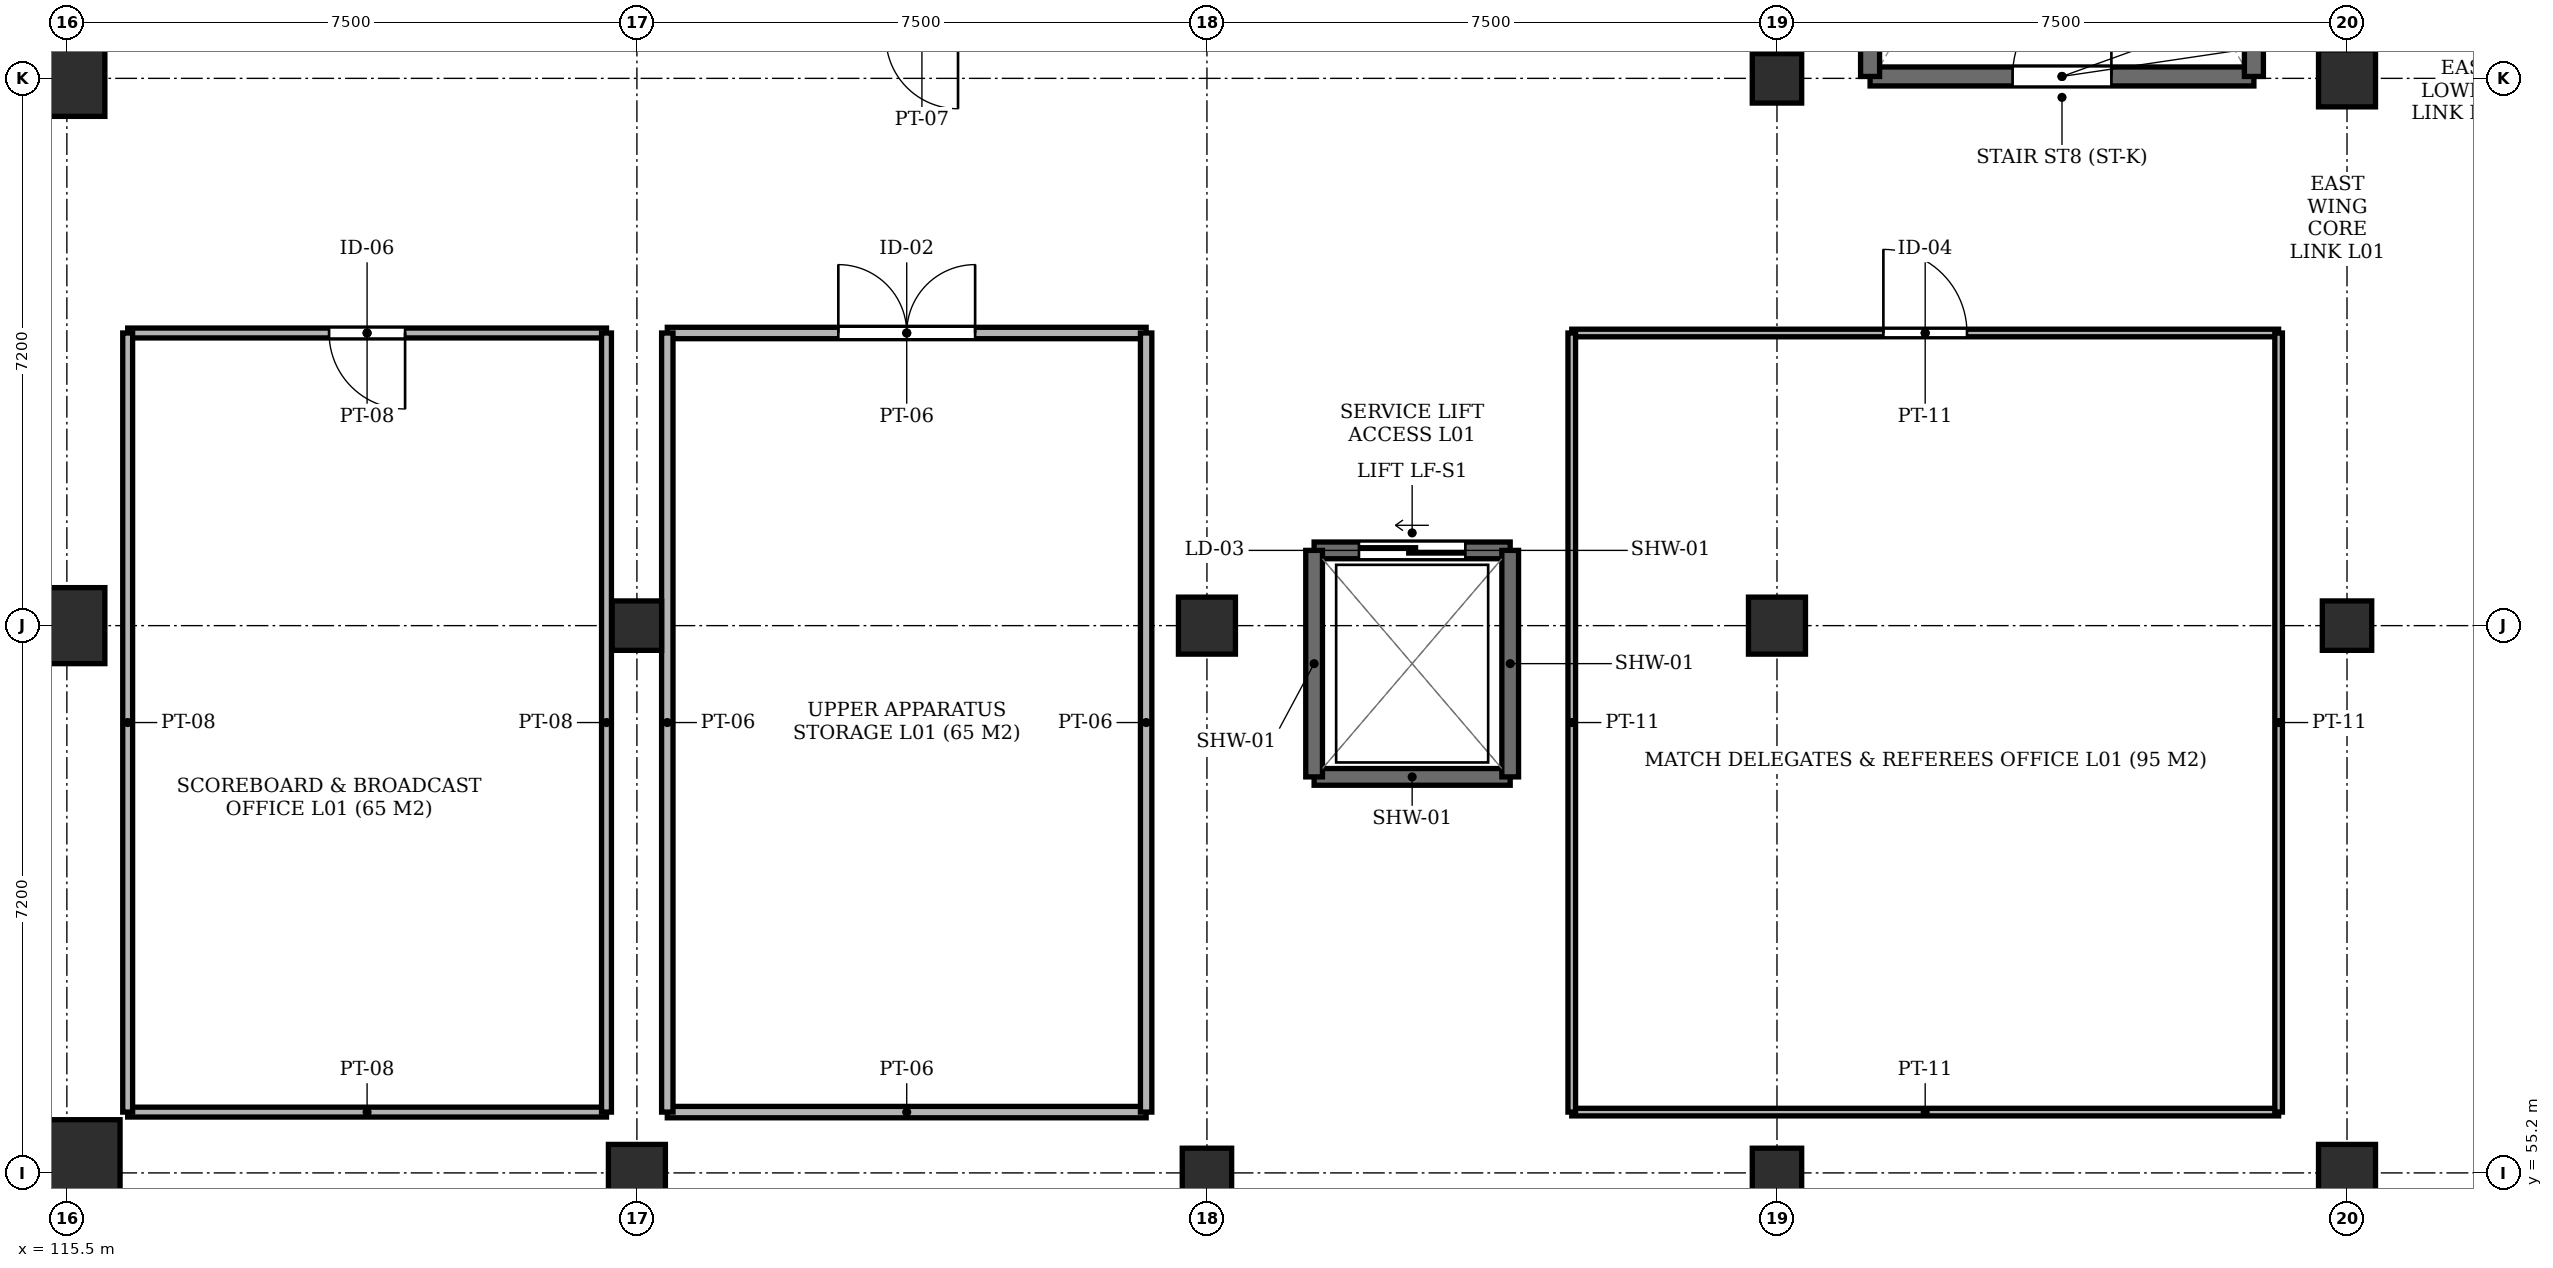
"""IFC4 building model, lengths in metres.
Left out: names, types, materials, properties, quantities, classifications, styles, units other than length and angle.
Written with IfcOpenShell. Run it as: python <this file> out.ifc"""

import sys

from ifc_helpers import new_model, si_unit, direction, frame, frame_2d, origin, origin_2d, place, context, subcontext, project, spatial, rectangle, extrude, element, fill, save


model = new_model("IFC4")
c1 = context("Model", 3, precision=1e-05, world=origin(), true_north=direction((0.0, 1.0)))
c2 = subcontext(c1, "Body", "Model", "MODEL_VIEW")
j1 = project(units=[si_unit("LENGTHUNIT", "METRE"), si_unit("PLANEANGLEUNIT", "RADIAN")], contexts=[c1])
p1 = place(None, origin())
s1 = spatial("IfcSite", under=j1, at=p1, CompositionType="ELEMENT")
p2 = place(p1, origin())
s2 = spatial("IfcBuilding", under=s1, at=p2, CompositionType="ELEMENT")
p3 = place(p2, frame((0.0, 0.0, 4.6)))
s3 = spatial("IfcBuildingStorey", under=s2, at=p3, CompositionType="ELEMENT", Elevation=4.6)
p4 = place(p3, frame((115.5, 55.2, -0.3), z_axis=(0.0, 0.0, 1.0), x_axis=(1.0, 0.0, 0.0)))
e1 = element("IfcColumn", 1, at=p4, inside=s3, PredefinedType="COLUMN", context=c2, shape_type="SweptSolid", body=[
    extrude(rectangle(XDim=1.4, YDim=1.4, at=origin_2d()), origin(), (0.0, 0.0, 1.0), 4.65),
])
for number, where, z_axis, x_axis in (
    (2, (115.5, 62.4, -0.3), (0.0, 0.0, 1.0), (1.0, 0.0, 0.0)),
    (3, (115.5, 69.6, -0.3), (0.0, 0.0, 1.0), (1.0, 0.0, 0.0)),
):
    element("IfcColumn", number, at=place(p3, frame(where, z_axis=z_axis, x_axis=x_axis)), inside=s3, PredefinedType="COLUMN", context=c2, shape_type="SweptSolid", body=[
        extrude(rectangle(XDim=1.0, YDim=1.0, at=origin_2d()), origin(), (0.0, 0.0, 1.0), 4.65),
    ])
p5 = place(p3, frame((123.0, 55.2, -0.3), z_axis=(0.0, 0.0, 1.0), x_axis=(1.0, 0.0, 0.0)))
e4 = element("IfcColumn", 4, at=p5, inside=s3, PredefinedType="COLUMN", context=c2, shape_type="SweptSolid", body=[
    extrude(rectangle(XDim=0.75, YDim=0.75, at=origin_2d()), origin(), (0.0, 0.0, 1.0), 4.65),
])
for number, where, z_axis, x_axis in (
    (5, (123.0, 62.4, -0.3), (0.0, 0.0, 1.0), (1.0, 0.0, 0.0)),
    (6, (130.5, 55.2, -0.3), (0.0, 0.0, 1.0), (1.0, 0.0, 0.0)),
):
    element("IfcColumn", number, at=place(p3, frame(where, z_axis=z_axis, x_axis=x_axis)), inside=s3, PredefinedType="COLUMN", context=c2, shape_type="SweptSolid", body=[
        extrude(rectangle(XDim=0.65, YDim=0.65, at=origin_2d()), origin(), (0.0, 0.0, 1.0), 4.65),
    ])
p6 = place(p3, frame((130.5, 62.4, -0.3), z_axis=(0.0, 0.0, 1.0), x_axis=(1.0, 0.0, 0.0)))
e7 = element("IfcColumn", 7, at=p6, inside=s3, PredefinedType="COLUMN", context=c2, shape_type="SweptSolid", body=[
    extrude(rectangle(XDim=0.75, YDim=0.75, at=origin_2d()), origin(), (0.0, 0.0, 1.0), 4.65),
])
p7 = place(p3, frame((138.0, 55.2, -0.3), z_axis=(0.0, 0.0, 1.0), x_axis=(1.0, 0.0, 0.0)))
e8 = element("IfcColumn", 8, at=p7, inside=s3, PredefinedType="COLUMN", context=c2, shape_type="SweptSolid", body=[
    extrude(rectangle(XDim=0.65, YDim=0.65, at=origin_2d()), origin(), (0.0, 0.0, 1.0), 4.65),
])
p8 = place(p3, frame((138.0, 62.4, -0.3), z_axis=(0.0, 0.0, 1.0), x_axis=(1.0, 0.0, 0.0)))
e9 = element("IfcColumn", 9, at=p8, inside=s3, PredefinedType="COLUMN", context=c2, shape_type="SweptSolid", body=[
    extrude(rectangle(XDim=0.75, YDim=0.75, at=origin_2d()), origin(), (0.0, 0.0, 1.0), 4.65),
])
p9 = place(p3, frame((138.0, 69.6, -0.3), z_axis=(0.0, 0.0, 1.0), x_axis=(1.0, 0.0, 0.0)))
e10 = element("IfcColumn", 10, at=p9, inside=s3, PredefinedType="COLUMN", context=c2, shape_type="SweptSolid", body=[
    extrude(rectangle(XDim=0.65, YDim=0.65, at=origin_2d()), origin(), (0.0, 0.0, 1.0), 4.65),
])
p10 = place(p3, frame((145.5, 55.2, -0.3), z_axis=(0.0, 0.0, 1.0), x_axis=(1.0, 0.0, 0.0)))
e11 = element("IfcColumn", 11, at=p10, inside=s3, PredefinedType="COLUMN", context=c2, shape_type="SweptSolid", body=[
    extrude(rectangle(XDim=0.75, YDim=0.75, at=origin_2d()), origin(), (0.0, 0.0, 1.0), 4.65),
])
p11 = place(p3, frame((145.5, 62.4, -0.3), z_axis=(0.0, 0.0, 1.0), x_axis=(1.0, 0.0, 0.0)))
e12 = element("IfcColumn", 12, at=p11, inside=s3, PredefinedType="COLUMN", context=c2, shape_type="SweptSolid", body=[
    extrude(rectangle(XDim=0.65, YDim=0.65, at=origin_2d()), origin(), (0.0, 0.0, 1.0), 4.65),
])
p12 = place(p3, frame((145.5, 69.6, -0.3), z_axis=(0.0, 0.0, 1.0), x_axis=(1.0, 0.0, 0.0)))
e13 = element("IfcColumn", 13, at=p12, inside=s3, PredefinedType="COLUMN", context=c2, shape_type="SweptSolid", body=[
    extrude(rectangle(XDim=0.75, YDim=0.75, at=origin_2d()), origin(), (0.0, 0.0, 1.0), 4.65),
])
p13 = place(p3, frame((139.225, 69.625, 0.0), z_axis=(0.0, 0.0, 1.0), x_axis=(1.0, 0.0, 0.0)))
e14 = element("IfcWall", 14, at=p13, inside=s3, PredefinedType="SHEAR", context=c2, shape_type="SweptSolid", body=[
    extrude(rectangle(XDim=5.05, YDim=0.25, at=frame_2d((2.525, 0.0))), origin(), (0.0, 0.0, 1.0), 4.48),
])
p14 = place(p13, frame((1.875, 0.0, 0.0)))
e15 = element("IfcOpeningElement", 15, at=p14, cuts=e14, PredefinedType="OPENING", context=c2, shape_type="SweptSolid", body=[
    extrude(rectangle(XDim=1.3, YDim=2.2, at=frame_2d((0.65, 1.1))), frame((0.0, 0.137, 0.0), z_axis=(0.0, -1.0, 0.0), x_axis=(1.0, 0.0, 0.0)), (0.0, 0.0, 1.0), 0.274),
])
for number, where, z_axis, x_axis in (
    (16, (139.225, 78.325, 0.0), (0.0, 0.0, 1.0), (0.0, -1.0, 0.0)),
    (17, (144.275, 69.625, 0.0), (0.0, 0.0, 1.0), (0.0, 1.0, 0.0)),
):
    element("IfcWall", number, at=place(p3, frame(where, z_axis=z_axis, x_axis=x_axis)), inside=s3, PredefinedType="SHEAR", context=c2, shape_type="SweptSolid", body=[
        extrude(rectangle(XDim=8.7, YDim=0.25, at=frame_2d((4.35, 0.0))), origin(), (0.0, 0.0, 1.0), 4.48),
    ])
p15 = place(p3, frame((131.91, 60.41, 0.0), z_axis=(0.0, 0.0, 1.0), x_axis=(1.0, 0.0, 0.0)))
e18 = element("IfcWall", 18, at=p15, inside=s3, PredefinedType="SHEAR", context=c2, shape_type="SweptSolid", body=[
    extrude(rectangle(XDim=2.58, YDim=0.22, at=frame_2d((1.29, 0.0))), origin(), (0.0, 0.0, 1.0), 4.35),
])
p16 = place(p3, frame((134.49, 63.39, 0.0), z_axis=(0.0, 0.0, 1.0), x_axis=(-1.0, 0.0, 0.0)))
e19 = element("IfcWall", 19, at=p16, inside=s3, PredefinedType="SHEAR", context=c2, shape_type="SweptSolid", body=[
    extrude(rectangle(XDim=2.58, YDim=0.22, at=frame_2d((1.29, 0.0))), origin(), (0.0, 0.0, 1.0), 4.35),
])
p17 = place(p16, frame((0.59, 0.0, 0.0)))
e20 = element("IfcOpeningElement", 20, at=p17, cuts=e19, PredefinedType="OPENING", context=c2, shape_type="SweptSolid", body=[
    extrude(rectangle(XDim=1.4, YDim=2.3, at=frame_2d((0.7, 1.15))), frame((0.0, 0.122, 0.0), z_axis=(0.0, -1.0, 0.0), x_axis=(1.0, 0.0, 0.0)), (0.0, 0.0, 1.0), 0.244),
])
for number, where, z_axis, x_axis in (
    (21, (131.91, 63.39, 0.0), (0.0, 0.0, 1.0), (0.0, -1.0, 0.0)),
    (22, (134.49, 60.41, 0.0), (0.0, 0.0, 1.0), (0.0, 1.0, 0.0)),
):
    element("IfcWall", number, at=place(p3, frame(where, z_axis=z_axis, x_axis=x_axis)), inside=s3, PredefinedType="SHEAR", context=c2, shape_type="SweptSolid", body=[
        extrude(rectangle(XDim=2.98, YDim=0.22, at=frame_2d((1.49, 0.0))), origin(), (0.0, 0.0, 1.0), 4.35),
    ])
p18 = place(p3, frame((116.3, 56.0, 0.0), z_axis=(0.0, 0.0, 1.0), x_axis=(1.0, 0.0, 0.0)))
e23 = element("IfcWall", 23, at=p18, inside=s3, PredefinedType="PARTITIONING", context=c2, shape_type="SweptSolid", body=[
    extrude(rectangle(XDim=6.3, YDim=0.13, at=frame_2d((3.15, 0.0))), origin(), (0.0, 0.0, 1.0), 4.08),
])
p19 = place(p3, frame((116.3, 66.25, 0.0), z_axis=(0.0, 0.0, 1.0), x_axis=(1.0, 0.0, 0.0)))
e24 = element("IfcWall", 24, at=p19, inside=s3, PredefinedType="PARTITIONING", context=c2, shape_type="SweptSolid", body=[
    extrude(rectangle(XDim=6.3, YDim=0.13, at=frame_2d((3.15, 0.0))), origin(), (0.0, 0.0, 1.0), 4.08),
])
p20 = place(p19, frame((2.65, 0.0, 0.0)))
e25 = element("IfcOpeningElement", 25, at=p20, cuts=e24, PredefinedType="OPENING", context=c2, shape_type="SweptSolid", body=[
    extrude(rectangle(XDim=1.0, YDim=2.15, at=frame_2d((0.5, 1.075))), frame((0.0, 0.077, 0.0), z_axis=(0.0, -1.0, 0.0), x_axis=(1.0, 0.0, 0.0)), (0.0, 0.0, 1.0), 0.154),
])
for number, where, z_axis, x_axis in (
    (26, (116.3, 56.0, 0.0), (0.0, 0.0, 1.0), (0.0, 1.0, 0.0)),
    (27, (122.6, 56.0, 0.0), (0.0, 0.0, 1.0), (0.0, 1.0, 0.0)),
):
    element("IfcWall", number, at=place(p3, frame(where, z_axis=z_axis, x_axis=x_axis)), inside=s3, PredefinedType="PARTITIONING", context=c2, shape_type="SweptSolid", body=[
        extrude(rectangle(XDim=10.25, YDim=0.13, at=frame_2d((5.125, 0.0))), origin(), (0.0, 0.0, 1.0), 4.08),
    ])
p21 = place(p3, frame((123.4, 56.0, 0.0), z_axis=(0.0, 0.0, 1.0), x_axis=(1.0, 0.0, 0.0)))
e28 = element("IfcWall", 28, at=p21, inside=s3, PredefinedType="PARTITIONING", context=c2, shape_type="SweptSolid", body=[
    extrude(rectangle(XDim=6.3, YDim=0.15, at=frame_2d((3.15, 0.0))), origin(), (0.0, 0.0, 1.0), 4.08),
])
p22 = place(p3, frame((123.4, 66.25, 0.0), z_axis=(0.0, 0.0, 1.0), x_axis=(1.0, 0.0, 0.0)))
e29 = element("IfcWall", 29, at=p22, inside=s3, PredefinedType="PARTITIONING", context=c2, shape_type="SweptSolid", body=[
    extrude(rectangle(XDim=6.3, YDim=0.15, at=frame_2d((3.15, 0.0))), origin(), (0.0, 0.0, 1.0), 4.08),
])
p23 = place(p22, frame((2.25, 0.0, 0.0)))
e30 = element("IfcOpeningElement", 30, at=p23, cuts=e29, PredefinedType="OPENING", context=c2, shape_type="SweptSolid", body=[
    extrude(rectangle(XDim=1.8, YDim=2.25, at=frame_2d((0.9, 1.125))), frame((0.0, 0.087, 0.0), z_axis=(0.0, -1.0, 0.0), x_axis=(1.0, 0.0, 0.0)), (0.0, 0.0, 1.0), 0.174),
])
for number, where, z_axis, x_axis in (
    (31, (123.4, 56.0, 0.0), (0.0, 0.0, 1.0), (0.0, 1.0, 0.0)),
    (32, (129.7, 56.0, 0.0), (0.0, 0.0, 1.0), (0.0, 1.0, 0.0)),
):
    element("IfcWall", number, at=place(p3, frame(where, z_axis=z_axis, x_axis=x_axis)), inside=s3, PredefinedType="PARTITIONING", context=c2, shape_type="SweptSolid", body=[
        extrude(rectangle(XDim=10.25, YDim=0.15, at=frame_2d((5.125, 0.0))), origin(), (0.0, 0.0, 1.0), 4.08),
    ])
p24 = place(p3, frame((135.3, 56.0, 0.0), z_axis=(0.0, 0.0, 1.0), x_axis=(1.0, 0.0, 0.0)))
e33 = element("IfcWall", 33, at=p24, inside=s3, PredefinedType="PARTITIONING", context=c2, shape_type="SweptSolid", body=[
    extrude(rectangle(XDim=9.3, YDim=0.1, at=frame_2d((4.65, 0.0))), origin(), (0.0, 0.0, 1.0), 4.08),
])
p25 = place(p3, frame((135.3, 66.25, 0.0), z_axis=(0.0, 0.0, 1.0), x_axis=(1.0, 0.0, 0.0)))
e34 = element("IfcWall", 34, at=p25, inside=s3, PredefinedType="PARTITIONING", context=c2, shape_type="SweptSolid", body=[
    extrude(rectangle(XDim=9.3, YDim=0.1, at=frame_2d((4.65, 0.0))), origin(), (0.0, 0.0, 1.0), 4.08),
])
p26 = place(p25, frame((4.1, 0.0, 0.0)))
e35 = element("IfcOpeningElement", 35, at=p26, cuts=e34, PredefinedType="OPENING", context=c2, shape_type="SweptSolid", body=[
    extrude(rectangle(XDim=1.1, YDim=2.15, at=frame_2d((0.55, 1.075))), frame((0.0, 0.062, 0.0), z_axis=(0.0, -1.0, 0.0), x_axis=(1.0, 0.0, 0.0)), (0.0, 0.0, 1.0), 0.124),
])
for number, where, z_axis, x_axis in (
    (36, (135.3, 56.0, 0.0), (0.0, 0.0, 1.0), (0.0, 1.0, 0.0)),
    (37, (144.6, 56.0, 0.0), (0.0, 0.0, 1.0), (0.0, 1.0, 0.0)),
):
    element("IfcWall", number, at=place(p3, frame(where, z_axis=z_axis, x_axis=x_axis)), inside=s3, PredefinedType="PARTITIONING", context=c2, shape_type="SweptSolid", body=[
        extrude(rectangle(XDim=10.25, YDim=0.1, at=frame_2d((5.125, 0.0))), origin(), (0.0, 0.0, 1.0), 4.08),
    ])
p27 = place(p14, origin())
e38 = element("IfcDoor", 38, at=p27, inside=s3, OperationType="SINGLE_SWING_RIGHT", PredefinedType="DOOR", context=c2, shape_type="SweptSolid", body=[
    extrude(rectangle(XDim=1.3, YDim=2.2, at=frame_2d((0.65, 1.1))), frame((0.0, 0.025, 0.0), z_axis=(0.0, -1.0, 0.0), x_axis=(1.0, 0.0, 0.0)), (0.0, 0.0, 1.0), 0.05),
])
fill(e15, e38)
p28 = place(p17, origin())
e39 = element("IfcDoor", 39, at=p28, inside=s3, OperationType="SLIDING_TO_RIGHT", PredefinedType="DOOR", context=c2, shape_type="SweptSolid", body=[
    extrude(rectangle(XDim=1.4, YDim=2.3, at=frame_2d((0.7, 1.15))), frame((0.0, 0.025, 0.0), z_axis=(0.0, -1.0, 0.0), x_axis=(1.0, 0.0, 0.0)), (0.0, 0.0, 1.0), 0.05),
])
fill(e20, e39)
p29 = place(p20, frame((1.0, 0.0, 0.0), z_axis=(0.0, 0.0, 1.0), x_axis=(-1.0, 0.0, 0.0)))
e40 = element("IfcDoor", 40, at=p29, inside=s3, OperationType="SINGLE_SWING_RIGHT", PredefinedType="DOOR", context=c2, shape_type="SweptSolid", body=[
    extrude(rectangle(XDim=1.0, YDim=2.15, at=frame_2d((0.5, 1.075))), frame((0.0, 0.025, 0.0), z_axis=(0.0, -1.0, 0.0), x_axis=(1.0, 0.0, 0.0)), (0.0, 0.0, 1.0), 0.05),
])
fill(e25, e40)
p30 = place(p23, origin())
e41 = element("IfcDoor", 41, at=p30, inside=s3, OperationType="DOUBLE_DOOR_SINGLE_SWING", PredefinedType="DOOR", context=c2, shape_type="SweptSolid", body=[
    extrude(rectangle(XDim=1.8, YDim=2.25, at=frame_2d((0.9, 1.125))), frame((0.0, 0.025, 0.0), z_axis=(0.0, -1.0, 0.0), x_axis=(1.0, 0.0, 0.0)), (0.0, 0.0, 1.0), 0.05),
])
fill(e30, e41)
p31 = place(p26, origin())
e42 = element("IfcDoor", 42, at=p31, inside=s3, OperationType="SINGLE_SWING_LEFT", PredefinedType="DOOR", context=c2, shape_type="SweptSolid", body=[
    extrude(rectangle(XDim=1.1, YDim=2.15, at=frame_2d((0.55, 1.075))), frame((0.0, 0.025, 0.0), z_axis=(0.0, -1.0, 0.0), x_axis=(1.0, 0.0, 0.0)), (0.0, 0.0, 1.0), 0.05),
])
fill(e35, e42)
save(model, sys.argv[1])
